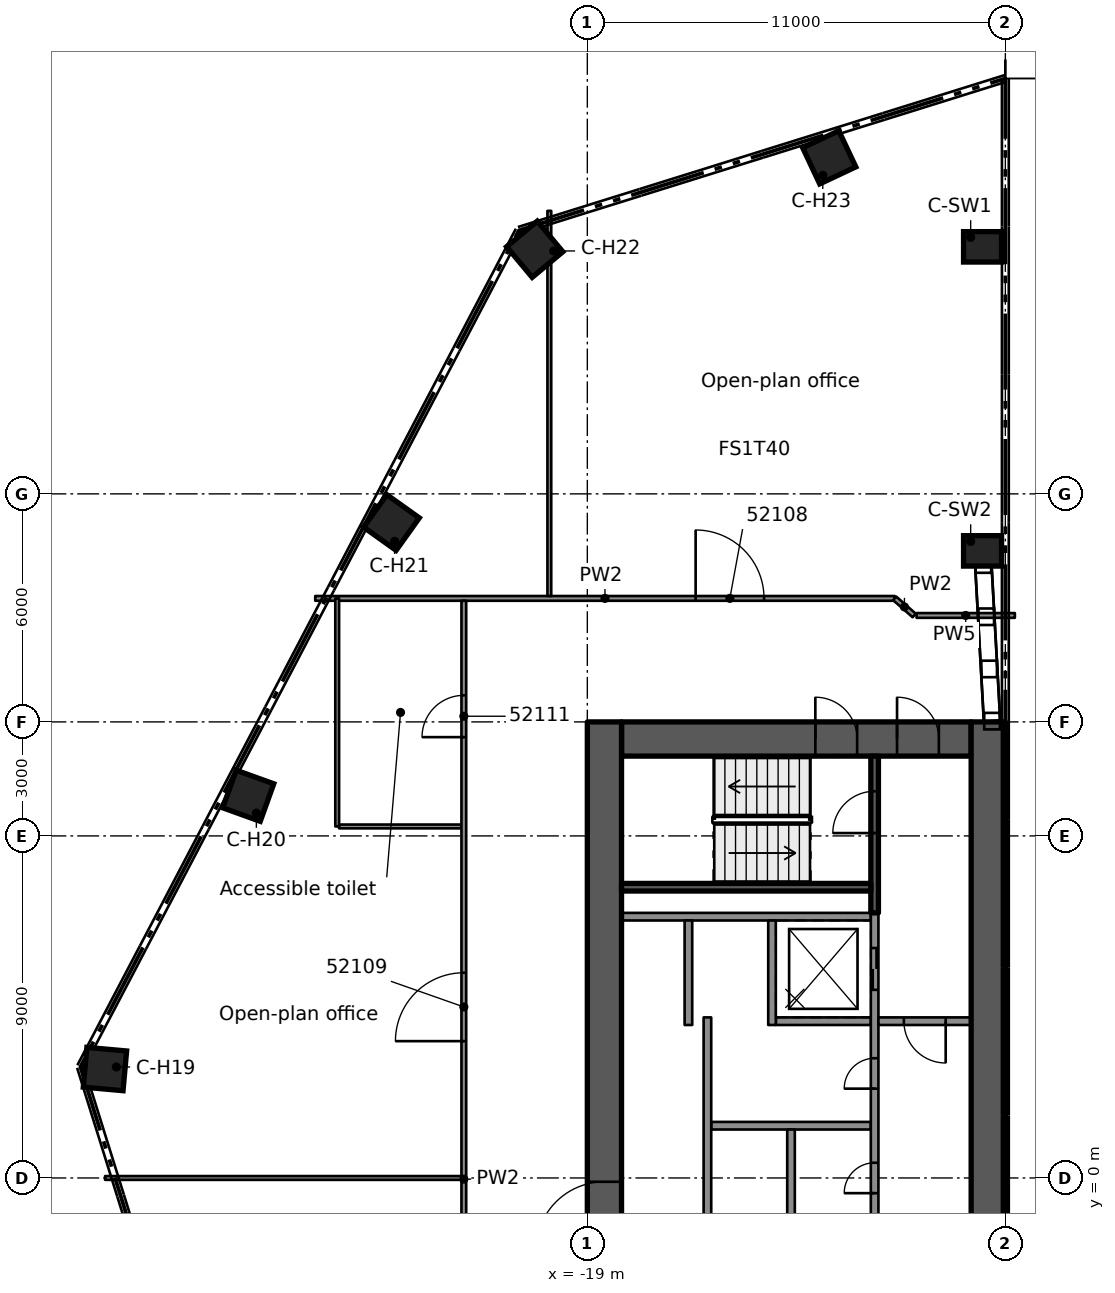
"""IFC4 building model, lengths in metres.
Left out: names, types, materials, properties, quantities, classifications, styles, units other than length and angle.
Written with IfcOpenShell. Run it as: python <this file> out.ifc"""

import sys

from ifc_helpers import new_model, si_unit, direction, frame, frame_2d, origin, origin_2d, place, context, subcontext, project, spatial, rectangle, extrude, element, fill, save


model = new_model("IFC4")
c1 = context("Model", 3, precision=1e-05, world=origin(), true_north=direction((0.0, 1.0)))
c2 = subcontext(c1, "Body", "Model", "MODEL_VIEW")
j1 = project(units=[si_unit("LENGTHUNIT", "METRE"), si_unit("PLANEANGLEUNIT", "RADIAN")], contexts=[c1])
p1 = place(None, origin())
s1 = spatial("IfcSite", under=j1, at=p1, CompositionType="ELEMENT")
p2 = place(p1, origin())
s2 = spatial("IfcBuilding", under=s1, at=p2, CompositionType="ELEMENT")
p3 = place(p2, frame((0.0, 0.0, 257.0)))
s3 = spatial("IfcBuildingStorey", under=s2, at=p3, CompositionType="ELEMENT", Elevation=257.0)
p4 = place(p3, frame((-18.1, 11.55, 0.0), z_axis=(0.0, 0.0, 1.0), x_axis=(1.0, 0.0, 0.0)))
e1 = element("IfcWall", 1, at=p4, inside=s3, PredefinedType="SHEAR", context=c2, shape_type="SweptSolid", body=[
    extrude(rectangle(XDim=9.2, YDim=0.9, at=frame_2d((4.6, 0.0))), origin(), (0.0, 0.0, 1.0), 3.5),
])
p5 = place(p4, frame((7.25, 0.0, 0.0)))
e2 = element("IfcOpeningElement", 2, at=p5, cuts=e1, PredefinedType="OPENING", context=c2, shape_type="SweptSolid", body=[
    extrude(rectangle(XDim=1.1, YDim=2.1, at=frame_2d((0.55, 1.05))), frame((0.0, 0.46, 0.0), z_axis=(0.0, -1.0, 0.0), x_axis=(1.0, 0.0, 0.0)), (0.0, 0.0, 1.0), 0.92),
])
p6 = place(p4, frame((5.1, 0.0, 0.0)))
e3 = element("IfcOpeningElement", 3, at=p6, cuts=e1, PredefinedType="OPENING", context=c2, shape_type="SweptSolid", body=[
    extrude(rectangle(XDim=1.1, YDim=2.1, at=frame_2d((0.55, 1.05))), frame((0.0, 0.46, 0.0), z_axis=(0.0, -1.0, 0.0), x_axis=(1.0, 0.0, 0.0)), (0.0, 0.0, 1.0), 0.92),
])
p7 = place(p3, frame((-18.55, -12.0, 0.0), z_axis=(0.0, 0.0, 1.0), x_axis=(0.0, 1.0, 0.0)))
e4 = element("IfcWall", 4, at=p7, inside=s3, PredefinedType="SHEAR", context=c2, shape_type="SweptSolid", body=[
    extrude(rectangle(XDim=24.0, YDim=0.9, at=frame_2d((12.0, 0.0))), origin(), (0.0, 0.0, 1.0), 3.5),
])
p8 = place(p7, frame((10.1, 0.0, 0.0)))
e5 = element("IfcOpeningElement", 5, at=p8, cuts=e4, PredefinedType="OPENING", context=c2, shape_type="SweptSolid", body=[
    extrude(rectangle(XDim=1.8, YDim=2.1, at=frame_2d((0.9, 1.05))), frame((0.0, 0.46, 0.0), z_axis=(0.0, -1.0, 0.0), x_axis=(1.0, 0.0, 0.0)), (0.0, 0.0, 1.0), 0.92),
])
p9 = place(p3, frame((-8.45, -12.0, 0.0), z_axis=(0.0, 0.0, 1.0), x_axis=(0.0, 1.0, 0.0)))
e6 = element("IfcWall", 6, at=p9, inside=s3, PredefinedType="SHEAR", context=c2, shape_type="SweptSolid", body=[
    extrude(rectangle(XDim=24.0, YDim=0.9, at=frame_2d((12.0, 0.0))), origin(), (0.0, 0.0, 1.0), 3.5),
])
for number, where, z_axis, x_axis in (
    (7, (-31.693, 2.866, 0.0), (0.0, 0.0, 1.0), (-0.996, 0.09, 0.0)),
    (8, (-27.923, 10.056, 0.0), (0.0, 0.0, 1.0), (-0.941, 0.339, 0.0)),
    (9, (-24.154, 17.246, 0.0), (0.0, 0.0, 1.0), (-0.814, 0.581, 0.0)),
    (10, (-20.384, 24.437, 0.0), (0.0, 0.0, 1.0), (-0.641, 0.768, 0.0)),
    (11, (-12.634, 26.855, 0.0), (0.0, 0.0, 1.0), (-0.426, 0.905, 0.0)),
):
    element("IfcColumn", number, at=place(p3, frame(where, z_axis=z_axis, x_axis=x_axis)), inside=s3, PredefinedType="COLUMN", context=c2, shape_type="SweptSolid", body=[
        extrude(rectangle(XDim=1.05, YDim=1.05, at=origin_2d()), origin(), (0.0, 0.0, 1.0), 3.5),
    ])
for number, where, z_axis, x_axis in (
    (12, (-8.6, 24.5, 0.0), (0.0, 0.0, 1.0), (1.0, 0.0, 0.0)),
    (13, (-8.6, 16.5, 0.0), (0.0, 0.0, 1.0), (1.0, 0.0, 0.0)),
):
    element("IfcColumn", number, at=place(p3, frame(where, z_axis=z_axis, x_axis=x_axis)), inside=s3, PredefinedType="COLUMN", context=c2, shape_type="SweptSolid", body=[
        extrude(rectangle(XDim=1.0, YDim=0.8, at=origin_2d()), origin(), (0.0, 0.0, 1.0), 3.5),
    ])
p10 = place(p3, frame((-11.54, 6.875, 0.0), z_axis=(0.0, 0.0, 1.0), x_axis=(-1.0, 0.0, 0.0)))
e14 = element("IfcWall", 14, at=p10, inside=s3, PredefinedType="SOLIDWALL", context=c2, shape_type="SweptSolid", body=[
    extrude(rectangle(XDim=6.56, YDim=0.2, at=frame_2d((3.28, 0.0))), origin(), (0.0, 0.0, 1.0), 3.09),
])
p11 = place(p3, frame((-11.54, 1.375, 0.0), z_axis=(0.0, 0.0, 1.0), x_axis=(-1.0, 0.0, 0.0)))
e15 = element("IfcWall", 15, at=p11, inside=s3, PredefinedType="SOLIDWALL", context=c2, shape_type="SweptSolid", body=[
    extrude(rectangle(XDim=4.2, YDim=0.2, at=frame_2d((2.1, 0.0))), origin(), (0.0, 0.0, 1.0), 3.09),
])
p12 = place(p3, frame((-11.54, 4.125, 0.0), z_axis=(0.0, 0.0, 1.0), x_axis=(-1.0, 0.0, 0.0)))
e16 = element("IfcWall", 16, at=p12, inside=s3, PredefinedType="SOLIDWALL", context=c2, shape_type="SweptSolid", body=[
    extrude(rectangle(XDim=2.5, YDim=0.2, at=frame_2d((1.25, 0.0))), origin(), (0.0, 0.0, 1.0), 3.09),
])
p13 = place(p3, frame((-11.44, -6.975, 0.0), z_axis=(0.0, 0.0, 1.0), x_axis=(0.0, 1.0, 0.0)))
e17 = element("IfcWall", 17, at=p13, inside=s3, PredefinedType="SOLIDWALL", context=c2, shape_type="SweptSolid", body=[
    extrude(rectangle(XDim=13.95, YDim=0.2, at=frame_2d((6.975, 0.0))), origin(), (0.0, 0.0, 1.0), 3.09),
])
p14 = place(p13, frame((0.925, 0.0, 0.0)))
e18 = element("IfcOpeningElement", 18, at=p14, cuts=e17, PredefinedType="OPENING", context=c2, shape_type="SweptSolid", body=[
    extrude(rectangle(XDim=1.1, YDim=2.1, at=frame_2d((0.55, 1.05))), frame((0.0, 0.11, 0.0), z_axis=(0.0, -1.0, 0.0), x_axis=(1.0, 0.0, 0.0)), (0.0, 0.0, 1.0), 0.22),
])
p15 = place(p13, frame((3.675, 0.0, 0.0)))
e19 = element("IfcOpeningElement", 19, at=p15, cuts=e17, PredefinedType="OPENING", context=c2, shape_type="SweptSolid", body=[
    extrude(rectangle(XDim=1.1, YDim=2.1, at=frame_2d((0.55, 1.05))), frame((0.0, 0.11, 0.0), z_axis=(0.0, -1.0, 0.0), x_axis=(1.0, 0.0, 0.0)), (0.0, 0.0, 1.0), 0.22),
])
p16 = place(p13, frame((11.925, 0.0, 0.0)))
e20 = element("IfcOpeningElement", 20, at=p16, cuts=e17, PredefinedType="OPENING", context=c2, shape_type="SweptSolid", body=[
    extrude(rectangle(XDim=1.1, YDim=2.1, at=frame_2d((0.55, 1.05))), frame((0.0, 0.11, 0.0), z_axis=(0.0, -1.0, 0.0), x_axis=(1.0, 0.0, 0.0)), (0.0, 0.0, 1.0), 0.22),
])
p17 = place(p13, frame((6.575, 0.0, 0.0)))
e21 = element("IfcOpeningElement", 21, at=p17, cuts=e17, PredefinedType="OPENING", context=c2, shape_type="SweptSolid", body=[
    extrude(rectangle(XDim=0.8, YDim=2.1, at=frame_2d((0.4, 1.05))), frame((0.0, 0.11, 0.0), z_axis=(0.0, -1.0, 0.0), x_axis=(1.0, 0.0, 0.0)), (0.0, 0.0, 1.0), 0.22),
])
p18 = place(p13, frame((9.325, 0.0, 0.0)))
e22 = element("IfcOpeningElement", 22, at=p18, cuts=e17, PredefinedType="OPENING", context=c2, shape_type="SweptSolid", body=[
    extrude(rectangle(XDim=0.8, YDim=2.1, at=frame_2d((0.4, 1.05))), frame((0.0, 0.11, 0.0), z_axis=(0.0, -1.0, 0.0), x_axis=(1.0, 0.0, 0.0)), (0.0, 0.0, 1.0), 0.22),
])
p19 = place(p3, frame((-13.64, -4.025, 0.0), z_axis=(0.0, 0.0, 1.0), x_axis=(0.0, 1.0, 0.0)))
e23 = element("IfcWall", 23, at=p19, inside=s3, PredefinedType="SOLIDWALL", context=c2, shape_type="SweptSolid", body=[
    extrude(rectangle(XDim=5.3, YDim=0.2, at=frame_2d((2.65, 0.0))), origin(), (0.0, 0.0, 1.0), 3.09),
])
p20 = place(p3, frame((-14.14, 4.025, 0.0), z_axis=(0.0, 0.0, 1.0), x_axis=(0.0, 1.0, 0.0)))
e24 = element("IfcWall", 24, at=p20, inside=s3, PredefinedType="SOLIDWALL", context=c2, shape_type="SweptSolid", body=[
    extrude(rectangle(XDim=2.75, YDim=0.2, at=frame_2d((1.375, 0.0))), origin(), (0.0, 0.0, 1.0), 3.09),
])
p21 = place(p3, frame((-15.84, -4.025, 0.0), z_axis=(0.0, 0.0, 1.0), x_axis=(0.0, 1.0, 0.0)))
e25 = element("IfcWall", 25, at=p21, inside=s3, PredefinedType="SOLIDWALL", context=c2, shape_type="SweptSolid", body=[
    extrude(rectangle(XDim=8.25, YDim=0.2, at=frame_2d((4.125, 0.0))), origin(), (0.0, 0.0, 1.0), 3.09),
])
p22 = place(p21, frame((0.875, 0.0, 0.0)))
e26 = element("IfcOpeningElement", 26, at=p22, cuts=e25, PredefinedType="OPENING", context=c2, shape_type="SweptSolid", body=[
    extrude(rectangle(XDim=0.8, YDim=2.1, at=frame_2d((0.4, 1.05))), frame((0.0, 0.11, 0.0), z_axis=(0.0, -1.0, 0.0), x_axis=(1.0, 0.0, 0.0)), (0.0, 0.0, 1.0), 0.22),
])
p23 = place(p3, frame((-16.34, 4.025, 0.0), z_axis=(0.0, 0.0, 1.0), x_axis=(0.0, 1.0, 0.0)))
e27 = element("IfcWall", 27, at=p23, inside=s3, PredefinedType="SOLIDWALL", context=c2, shape_type="SweptSolid", body=[
    extrude(rectangle(XDim=2.75, YDim=0.2, at=frame_2d((1.375, 0.0))), origin(), (0.0, 0.0, 1.0), 3.09),
])
p24 = place(p3, frame((-11.44, 6.975, 0.0), z_axis=(0.0, 0.0, 1.0), x_axis=(0.0, 1.0, 0.0)))
e28 = element("IfcWall", 28, at=p24, inside=s3, PredefinedType="SOLIDWALL", context=c2, shape_type="SweptSolid", body=[
    extrude(rectangle(XDim=4.125, YDim=0.2, at=frame_2d((2.062, 0.0))), origin(), (0.0, 0.0, 1.0), 3.09),
])
p25 = place(p24, frame((2.1, 0.0, 0.0)))
e29 = element("IfcOpeningElement", 29, at=p25, cuts=e28, PredefinedType="OPENING", context=c2, shape_type="SweptSolid", body=[
    extrude(rectangle(XDim=1.1, YDim=2.1, at=frame_2d((0.55, 1.05))), frame((0.0, 0.11, 0.0), z_axis=(0.0, -1.0, 0.0), x_axis=(1.0, 0.0, 0.0)), (0.0, 0.0, 1.0), 0.22),
])
p26 = place(p3, frame((-11.54, 7.65, 0.0), z_axis=(0.0, 0.0, 1.0), x_axis=(-1.0, 0.0, 0.0)))
e30 = element("IfcWall", 30, at=p26, inside=s3, PredefinedType="SOLIDWALL", context=c2, shape_type="SweptSolid", body=[
    extrude(rectangle(XDim=6.56, YDim=0.2, at=frame_2d((3.28, 0.0))), origin(), (0.0, 0.0, 1.0), 3.09),
])
p27 = place(p3, frame((-8.9, 4.125, 0.0), z_axis=(0.0, 0.0, 1.0), x_axis=(-1.0, 0.0, 0.0)))
e31 = element("IfcWall", 31, at=p27, inside=s3, PredefinedType="PARTITIONING", context=c2, shape_type="SweptSolid", body=[
    extrude(rectangle(XDim=2.44, YDim=0.2, at=frame_2d((1.22, 0.0))), origin(), (0.0, 0.0, 1.0), 3.09),
])
p28 = place(p27, frame((0.67, 0.0, 0.0)))
e32 = element("IfcOpeningElement", 32, at=p28, cuts=e31, PredefinedType="OPENING", context=c2, shape_type="SweptSolid", body=[
    extrude(rectangle(XDim=1.1, YDim=2.1, at=frame_2d((0.55, 1.05))), frame((0.0, 0.11, 0.0), z_axis=(0.0, -1.0, 0.0), x_axis=(1.0, 0.0, 0.0)), (0.0, 0.0, 1.0), 0.22),
])
p29 = place(p3, frame((-31.69, 0.0, 0.0), z_axis=(0.0, 0.0, 1.0), x_axis=(1.0, 0.0, 0.0)))
e33 = element("IfcWall", 33, at=p29, inside=s3, PredefinedType="PARTITIONING", context=c2, shape_type="SweptSolid", body=[
    extrude(rectangle(XDim=9.378, YDim=0.1, at=frame_2d((4.689, 0.0))), origin(), (0.0, 0.0, 1.0), 3.08),
])
p30 = place(p3, frame((-25.532, 9.249, 0.0), z_axis=(0.0, 0.0, 1.0), x_axis=(1.0, 0.0, 0.0)))
e34 = element("IfcWall", 34, at=p30, inside=s3, PredefinedType="PARTITIONING", context=c2, shape_type="SweptSolid", body=[
    extrude(rectangle(XDim=3.22, YDim=0.1, at=frame_2d((1.61, 0.0))), origin(), (0.0, 0.0, 1.0), 3.08),
])
p31 = place(p3, frame((-10.336, 14.801, 0.0), z_axis=(0.0, 0.0, 1.0), x_axis=(1.0, 0.0, 0.0)))
e35 = element("IfcWall", 35, at=p31, inside=s3, PredefinedType="PARTITIONING", context=c2, shape_type="SweptSolid", body=[
    extrude(rectangle(XDim=2.586, YDim=0.125, at=frame_2d((1.293, 0.0))), origin(), (0.0, 0.0, 1.0), 2.496),
])
p32 = place(p3, frame((-26.16, 15.25, 0.0), z_axis=(0.0, 0.0, 1.0), x_axis=(1.0, 0.0, 0.0)))
e36 = element("IfcWall", 36, at=p32, inside=s3, PredefinedType="PARTITIONING", context=c2, shape_type="SweptSolid", body=[
    extrude(rectangle(XDim=15.248, YDim=0.125, at=frame_2d((7.624, 0.0))), origin(), (0.0, 0.0, 1.0), 3.08),
])
p33 = place(p32, frame((10.01, 0.0, 0.0)))
e37 = element("IfcOpeningElement", 37, at=p33, cuts=e36, PredefinedType="OPENING", context=c2, shape_type="SweptSolid", body=[
    extrude(rectangle(XDim=1.8, YDim=2.1, at=frame_2d((0.9, 1.05))), frame((0.0, 0.073, 0.0), z_axis=(0.0, -1.0, 0.0), x_axis=(1.0, 0.0, 0.0)), (0.0, 0.0, 1.0), 0.145),
])
p34 = place(p3, frame((-10.399, 14.801, 0.0), z_axis=(0.0, 0.0, 1.0), x_axis=(-0.752621053173, 0.658453909032, 0.0)))
e38 = element("IfcWall", 38, at=p34, inside=s3, PredefinedType="PARTITIONING", context=c2, shape_type="SweptSolid", body=[
    extrude(rectangle(XDim=0.682, YDim=0.125, at=frame_2d((0.341, 0.0))), origin(), (0.0, 0.0, 1.0), 3.08),
])
p35 = place(p3, frame((-20.0, 15.313, 0.0), z_axis=(0.0, 0.0, 1.0), x_axis=(0.0, 1.0, 0.0)))
e39 = element("IfcWall", 39, at=p35, inside=s3, PredefinedType="PARTITIONING", context=c2, shape_type="SweptSolid", body=[
    extrude(rectangle(XDim=10.134, YDim=0.1, at=frame_2d((5.067, 0.0))), origin(), (0.0, 0.0, 1.0), 3.08),
])
p36 = place(p3, frame((-22.25, -15.25, 0.0), z_axis=(0.0, 0.0, 1.0), x_axis=(0.0, 1.0, 0.0)))
e40 = element("IfcWall", 40, at=p36, inside=s3, PredefinedType="PARTITIONING", context=c2, shape_type="SweptSolid", body=[
    extrude(rectangle(XDim=30.437, YDim=0.125, at=frame_2d((15.219, 0.0))), origin(), (0.0, 0.0, 1.0), 3.08),
])
p37 = place(p36, frame((6.6, 0.0, 0.0)))
e41 = element("IfcOpeningElement", 41, at=p37, cuts=e40, PredefinedType="OPENING", context=c2, shape_type="SweptSolid", body=[
    extrude(rectangle(XDim=1.8, YDim=2.1, at=frame_2d((0.9, 1.05))), frame((0.0, 0.073, 0.0), z_axis=(0.0, -1.0, 0.0), x_axis=(1.0, 0.0, 0.0)), (0.0, 0.0, 1.0), 0.145),
])
p38 = place(p36, frame((18.85, 0.0, 0.0)))
e42 = element("IfcOpeningElement", 42, at=p38, cuts=e40, PredefinedType="OPENING", context=c2, shape_type="SweptSolid", body=[
    extrude(rectangle(XDim=1.8, YDim=2.1, at=frame_2d((0.9, 1.05))), frame((0.0, 0.073, 0.0), z_axis=(0.0, -1.0, 0.0), x_axis=(1.0, 0.0, 0.0)), (0.0, 0.0, 1.0), 0.145),
])
p39 = place(p36, frame((26.849, 0.0, 0.0)))
e43 = element("IfcOpeningElement", 43, at=p39, cuts=e40, PredefinedType="OPENING", context=c2, shape_type="SweptSolid", body=[
    extrude(rectangle(XDim=1.1, YDim=2.1, at=frame_2d((0.55, 1.05))), frame((0.0, 0.073, 0.0), z_axis=(0.0, -1.0, 0.0), x_axis=(1.0, 0.0, 0.0)), (0.0, 0.0, 1.0), 0.145),
])
p40 = place(p3, frame((-25.582, 9.249, 0.0), z_axis=(0.0, 0.0, 1.0), x_axis=(0.0, 1.0, 0.0)))
e44 = element("IfcWall", 44, at=p40, inside=s3, PredefinedType="PARTITIONING", context=c2, shape_type="SweptSolid", body=[
    extrude(rectangle(XDim=6.0, YDim=0.1, at=frame_2d((3.0, 0.0))), origin(), (0.0, 0.0, 1.0), 3.08),
])
p41 = place(p16, origin())
e45 = element("IfcDoor", 45, at=p41, inside=s3, OperationType="DOUBLE_DOOR_SLIDING", PredefinedType="DOOR", context=c2, shape_type="SweptSolid", body=[
    extrude(rectangle(XDim=1.1, YDim=2.1, at=frame_2d((0.55, 1.05))), frame((0.0, 0.025, 0.0), z_axis=(0.0, -1.0, 0.0), x_axis=(1.0, 0.0, 0.0)), (0.0, 0.0, 1.0), 0.05),
])
fill(e20, e45)
p42 = place(p17, origin())
e46 = element("IfcDoor", 46, at=p42, inside=s3, OperationType="SINGLE_SWING_LEFT", PredefinedType="DOOR", context=c2, shape_type="SweptSolid", body=[
    extrude(rectangle(XDim=0.8, YDim=2.1, at=frame_2d((0.4, 1.05))), frame((0.0, 0.025, 0.0), z_axis=(0.0, -1.0, 0.0), x_axis=(1.0, 0.0, 0.0)), (0.0, 0.0, 1.0), 0.05),
])
fill(e21, e46)
p43 = place(p18, origin())
e47 = element("IfcDoor", 47, at=p43, inside=s3, OperationType="SINGLE_SWING_LEFT", PredefinedType="DOOR", context=c2, shape_type="SweptSolid", body=[
    extrude(rectangle(XDim=0.8, YDim=2.1, at=frame_2d((0.4, 1.05))), frame((0.0, 0.025, 0.0), z_axis=(0.0, -1.0, 0.0), x_axis=(1.0, 0.0, 0.0)), (0.0, 0.0, 1.0), 0.05),
])
fill(e22, e47)
p44 = place(p8, origin())
e48 = element("IfcDoor", 48, at=p44, inside=s3, OperationType="SINGLE_SWING_LEFT", PredefinedType="DOOR", context=c2, shape_type="SweptSolid", body=[
    extrude(rectangle(XDim=1.8, YDim=2.1, at=frame_2d((0.9, 1.05))), frame((0.0, 0.025, 0.0), z_axis=(0.0, -1.0, 0.0), x_axis=(1.0, 0.0, 0.0)), (0.0, 0.0, 1.0), 0.05),
])
fill(e5, e48)
p45 = place(p5, origin())
e49 = element("IfcDoor", 49, at=p45, inside=s3, OperationType="SINGLE_SWING_RIGHT", PredefinedType="DOOR", context=c2, shape_type="SweptSolid", body=[
    extrude(rectangle(XDim=1.1, YDim=2.1, at=frame_2d((0.55, 1.05))), frame((0.0, 0.025, 0.0), z_axis=(0.0, -1.0, 0.0), x_axis=(1.0, 0.0, 0.0)), (0.0, 0.0, 1.0), 0.05),
])
fill(e2, e49)
p46 = place(p28, origin())
e50 = element("IfcDoor", 50, at=p46, inside=s3, OperationType="SINGLE_SWING_RIGHT", PredefinedType="DOOR", context=c2, shape_type="SweptSolid", body=[
    extrude(rectangle(XDim=1.1, YDim=2.1, at=frame_2d((0.55, 1.05))), frame((0.0, 0.025, 0.0), z_axis=(0.0, -1.0, 0.0), x_axis=(1.0, 0.0, 0.0)), (0.0, 0.0, 1.0), 0.05),
])
fill(e32, e50)
p47 = place(p6, origin())
e51 = element("IfcDoor", 51, at=p47, inside=s3, OperationType="SINGLE_SWING_RIGHT", PredefinedType="DOOR", context=c2, shape_type="SweptSolid", body=[
    extrude(rectangle(XDim=1.1, YDim=2.1, at=frame_2d((0.55, 1.05))), frame((0.0, 0.025, 0.0), z_axis=(0.0, -1.0, 0.0), x_axis=(1.0, 0.0, 0.0)), (0.0, 0.0, 1.0), 0.05),
])
fill(e3, e51)
p48 = place(p25, origin())
e52 = element("IfcDoor", 52, at=p48, inside=s3, OperationType="SINGLE_SWING_RIGHT", PredefinedType="DOOR", context=c2, shape_type="SweptSolid", body=[
    extrude(rectangle(XDim=1.1, YDim=2.1, at=frame_2d((0.55, 1.05))), frame((0.0, 0.025, 0.0), z_axis=(0.0, -1.0, 0.0), x_axis=(1.0, 0.0, 0.0)), (0.0, 0.0, 1.0), 0.05),
])
fill(e29, e52)
p49 = place(p33, origin())
e53 = element("IfcDoor", 53, at=p49, inside=s3, OperationType="DOUBLE_DOOR_SINGLE_SWING", PredefinedType="DOOR", context=c2, shape_type="SweptSolid", body=[
    extrude(rectangle(XDim=1.8, YDim=2.1, at=frame_2d((0.9, 1.05))), frame((0.0, 0.025, 0.0), z_axis=(0.0, -1.0, 0.0), x_axis=(1.0, 0.0, 0.0)), (0.0, 0.0, 1.0), 0.05),
])
fill(e37, e53)
p50 = place(p38, origin())
e54 = element("IfcDoor", 54, at=p50, inside=s3, OperationType="DOUBLE_DOOR_SINGLE_SWING", PredefinedType="DOOR", context=c2, shape_type="SweptSolid", body=[
    extrude(rectangle(XDim=1.8, YDim=2.1, at=frame_2d((0.9, 1.05))), frame((0.0, 0.025, 0.0), z_axis=(0.0, -1.0, 0.0), x_axis=(1.0, 0.0, 0.0)), (0.0, 0.0, 1.0), 0.05),
])
fill(e42, e54)
p51 = place(p39, origin())
e55 = element("IfcDoor", 55, at=p51, inside=s3, OperationType="SINGLE_SWING_RIGHT", PredefinedType="DOOR", context=c2, shape_type="SweptSolid", body=[
    extrude(rectangle(XDim=1.1, YDim=2.1, at=frame_2d((0.55, 1.05))), frame((0.0, 0.025, 0.0), z_axis=(0.0, -1.0, 0.0), x_axis=(1.0, 0.0, 0.0)), (0.0, 0.0, 1.0), 0.05),
])
fill(e43, e55)
save(model, sys.argv[1])
